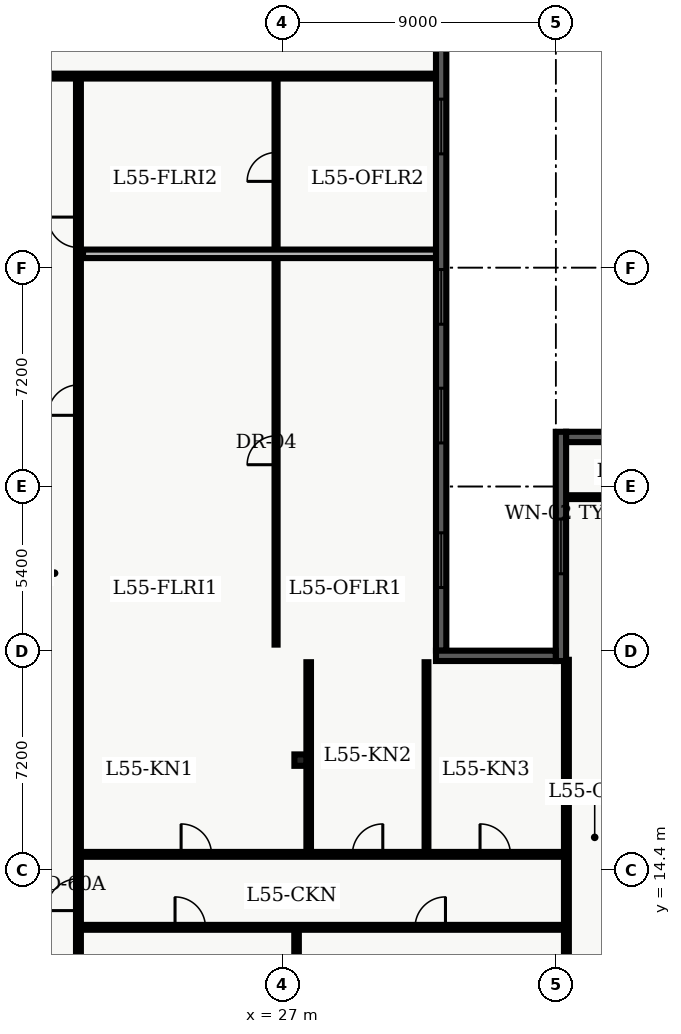
"""IFC4 building model, lengths in metres.
Left out: names, types, materials, properties, quantities, classifications, styles, units other than length and angle.
Written with IfcOpenShell. Run it as: python <this file> out.ifc"""

import sys

from ifc_helpers import new_model, entity, si_unit, converted_unit, direction, frame, origin_with_axes, origin_2d_with_axis, place, context, subcontext, project, spatial, polyline, rectangle, i_section, outline, extrude, element, fill, save


model = new_model("IFC4")
c1 = context("Model", 3, precision=1e-05, world=origin_with_axes(), true_north=direction((0.0, 1.0)))
c2 = subcontext(c1, "Body", "Model", "MODEL_VIEW")
j1 = project(units=[si_unit("LENGTHUNIT", "METRE"), converted_unit("PLANEANGLEUNIT", "DEGREE", entity("IfcPlaneAngleMeasure", 0.017), si_unit("PLANEANGLEUNIT", "RADIAN"), dimensions=[0, 0, 0, 0, 0, 0, 0])], contexts=[c1])
p1 = place(None, origin_with_axes())
s1 = spatial("IfcSite", under=j1, at=p1, CompositionType="ELEMENT")
p2 = place(p1, origin_with_axes())
s2 = spatial("IfcBuilding", under=s1, at=p2, CompositionType="ELEMENT")
p3 = place(p2, frame((0.0, 0.0, 224.7), z_axis=(0.0, 0.0, 1.0), x_axis=(1.0, 0.0, 0.0)))
s3 = spatial("IfcBuildingStorey", under=s2, at=p3, CompositionType="ELEMENT", Elevation=224.7)
p4 = place(p3, frame((27.6, 18.0, 0.0), z_axis=(0.0, 0.0, 1.0), x_axis=(1.0, 0.0, 0.0)))
e1 = element("IfcColumn", 1, at=p4, inside=s3, PredefinedType="COLUMN", context=c2, shape_type="SweptSolid", body=[
    extrude(i_section(OverallWidth=0.394, OverallDepth=0.375, WebThickness=0.017, FlangeThickness=0.028, FilletRadius=0.02, at=origin_2d_with_axis()), origin_with_axes(), (0.0, 0.0, 1.0), 3.9),
])
p5 = place(p3, frame((7.1, 40.5, 0.0), z_axis=(0.0, 0.0, 1.0), x_axis=(1.0, 0.0, 0.0)))
e2 = element("IfcWall", 2, at=p5, inside=s3, PredefinedType="PARTITIONING", context=c2, shape_type="SweptSolid", body=[
    extrude(outline(polyline([(0.0, -0.08), (24.965, -0.08), (24.965, 0.08), (0.0, 0.08), (0.0, -0.08)])), origin_with_axes(), (0.0, 0.0, 1.0), 2.7),
])
p6 = place(p5, frame((3.093, 0.0, 0.0), z_axis=(0.0, 0.0, 1.0), x_axis=(1.0, 0.0, 0.0)))
e3 = element("IfcOpeningElement", 3, at=p6, cuts=e2, PredefinedType="OPENING", context=c2, shape_type="SweptSolid", body=[
    extrude(rectangle(XDim=1.0, YDim=0.18, at=origin_2d_with_axis()), origin_with_axes(), (0.0, 0.0, 1.0), 2.15),
])
p7 = place(p5, frame((5.873, 0.0, 0.0), z_axis=(0.0, 0.0, 1.0), x_axis=(1.0, 0.0, 0.0)))
e4 = element("IfcOpeningElement", 4, at=p7, cuts=e2, PredefinedType="OPENING", context=c2, shape_type="SweptSolid", body=[
    extrude(rectangle(XDim=1.0, YDim=0.18, at=origin_2d_with_axis()), origin_with_axes(), (0.0, 0.0, 1.0), 2.15),
])
p8 = place(p5, frame((10.502, 0.0, 0.0), z_axis=(0.0, 0.0, 1.0), x_axis=(1.0, 0.0, 0.0)))
e5 = element("IfcOpeningElement", 5, at=p8, cuts=e2, PredefinedType="OPENING", context=c2, shape_type="SweptSolid", body=[
    extrude(rectangle(XDim=1.0, YDim=0.18, at=origin_2d_with_axis()), origin_with_axes(), (0.0, 0.0, 1.0), 2.15),
])
p9 = place(p3, frame((20.3, 7.8, 0.0), z_axis=(0.0, 0.0, 1.0), x_axis=(0.0, 1.0, 0.0)))
e6 = element("IfcWall", 6, at=p9, inside=s3, PredefinedType="PARTITIONING", context=c2, shape_type="SweptSolid", body=[
    extrude(outline(polyline([(0.0, -0.08), (32.7, -0.08), (32.7, 0.08), (0.0, 0.08), (0.0, -0.08)])), origin_with_axes(), (0.0, 0.0, 1.0), 2.7),
])
p10 = place(p9, frame((22.042, 0.0, 0.0), z_axis=(0.0, 0.0, 1.0), x_axis=(1.0, 0.0, 0.0)))
e7 = element("IfcOpeningElement", 7, at=p10, cuts=e6, PredefinedType="OPENING", context=c2, shape_type="SweptSolid", body=[
    extrude(rectangle(XDim=1.0, YDim=0.18, at=origin_2d_with_axis()), origin_with_axes(), (0.0, 0.0, 1.0), 2.15),
])
p11 = place(p9, frame((27.562, 0.0, 0.0), z_axis=(0.0, 0.0, 1.0), x_axis=(1.0, 0.0, 0.0)))
e8 = element("IfcOpeningElement", 8, at=p11, cuts=e6, PredefinedType="OPENING", context=c2, shape_type="SweptSolid", body=[
    extrude(rectangle(XDim=1.0, YDim=0.18, at=origin_2d_with_axis()), origin_with_axes(), (0.0, 0.0, 1.0), 2.15),
])
p12 = place(p9, frame((5.775, 0.0, 0.0), z_axis=(0.0, 0.0, 1.0), x_axis=(1.0, 0.0, 0.0)))
e9 = element("IfcOpeningElement", 9, at=p12, cuts=e6, PredefinedType="OPENING", context=c2, shape_type="SweptSolid", body=[
    extrude(rectangle(XDim=1.05, YDim=0.18, at=origin_2d_with_axis()), origin_with_axes(), (0.0, 0.0, 1.0), 2.15),
])
p13 = place(p3, frame((26.8, 21.8, 0.0), z_axis=(0.0, 0.0, 1.0), x_axis=(0.0, 1.0, 0.0)))
e10 = element("IfcWall", 10, at=p13, inside=s3, PredefinedType="PARTITIONING", context=c2, shape_type="SweptSolid", body=[
    extrude(outline(polyline([(0.0, -0.05), (18.5, -0.05), (18.5, 0.05), (0.0, 0.05), (0.0, -0.05)])), origin_with_axes(), (0.0, 0.0, 1.0), 2.7),
])
p14 = place(p13, frame((6.392, 0.0, 0.0), z_axis=(0.0, 0.0, 1.0), x_axis=(1.0, 0.0, 0.0)))
e11 = element("IfcOpeningElement", 11, at=p14, cuts=e10, PredefinedType="OPENING", context=c2, shape_type="SweptSolid", body=[
    extrude(rectangle(XDim=0.95, YDim=0.12, at=origin_2d_with_axis()), origin_with_axes(), (0.0, 0.0, 1.0), 2.15),
])
p15 = place(p13, frame((15.712, 0.0, 0.0), z_axis=(0.0, 0.0, 1.0), x_axis=(1.0, 0.0, 0.0)))
e12 = element("IfcOpeningElement", 12, at=p15, cuts=e10, PredefinedType="OPENING", context=c2, shape_type="SweptSolid", body=[
    extrude(rectangle(XDim=0.95, YDim=0.12, at=origin_2d_with_axis()), origin_with_axes(), (0.0, 0.0, 1.0), 2.15),
])
p16 = place(p3, frame((20.45, 34.654, 0.0), z_axis=(0.0, 0.0, 1.0), x_axis=(1.0, 0.0, 0.0)))
e13 = element("IfcWall", 13, at=p16, inside=s3, PredefinedType="PARTITIONING", context=c2, shape_type="SweptSolid", body=[
    extrude(outline(polyline([(0.0, -0.14), (11.615, -0.14), (11.615, 0.14), (0.0, 0.14), (0.0, -0.14)])), origin_with_axes(), (0.0, 0.0, 1.0), 2.7),
])
p17 = place(p3, frame((20.3, 12.5, 0.0), z_axis=(0.0, 0.0, 1.0), x_axis=(1.0, 0.0, 0.0)))
e14 = element("IfcWall", 14, at=p17, inside=s3, PredefinedType="PARTITIONING", context=c2, shape_type="SweptSolid", body=[
    extrude(outline(polyline([(0.0, -0.08), (16.05, -0.08), (16.05, 0.08), (0.0, 0.08), (0.0, -0.08)])), origin_with_axes(), (0.0, 0.0, 1.0), 2.7),
])
p18 = place(p17, frame((3.677, 0.0, 0.0), z_axis=(0.0, 0.0, 1.0), x_axis=(1.0, 0.0, 0.0)))
e15 = element("IfcOpeningElement", 15, at=p18, cuts=e14, PredefinedType="OPENING", context=c2, shape_type="SweptSolid", body=[
    extrude(rectangle(XDim=1.0, YDim=0.18, at=origin_2d_with_axis()), origin_with_axes(), (0.0, 0.0, 1.0), 2.15),
])
p19 = place(p17, frame((11.572, 0.0, 0.0), z_axis=(0.0, 0.0, 1.0), x_axis=(1.0, 0.0, 0.0)))
e16 = element("IfcOpeningElement", 16, at=p19, cuts=e14, PredefinedType="OPENING", context=c2, shape_type="SweptSolid", body=[
    extrude(rectangle(XDim=1.0, YDim=0.18, at=origin_2d_with_axis()), origin_with_axes(), (0.0, 0.0, 1.0), 2.15),
])
p20 = place(p3, frame((20.3, 14.9, 0.0), z_axis=(0.0, 0.0, 1.0), x_axis=(1.0, 0.0, 0.0)))
e17 = element("IfcWall", 17, at=p20, inside=s3, PredefinedType="PARTITIONING", context=c2, shape_type="SweptSolid", body=[
    extrude(outline(polyline([(0.0, -0.08), (16.05, -0.08), (16.05, 0.08), (0.0, 0.08), (0.0, -0.08)])), origin_with_axes(), (0.0, 0.0, 1.0), 2.7),
])
p21 = place(p20, frame((3.877, 0.0, 0.0), z_axis=(0.0, 0.0, 1.0), x_axis=(1.0, 0.0, 0.0)))
e18 = element("IfcOpeningElement", 18, at=p21, cuts=e17, PredefinedType="OPENING", context=c2, shape_type="SweptSolid", body=[
    extrude(rectangle(XDim=1.0, YDim=0.18, at=origin_2d_with_axis()), origin_with_axes(), (0.0, 0.0, 1.0), 2.15),
])
p22 = place(p20, frame((9.511, 0.0, 0.0), z_axis=(0.0, 0.0, 1.0), x_axis=(1.0, 0.0, 0.0)))
e19 = element("IfcOpeningElement", 19, at=p22, cuts=e17, PredefinedType="OPENING", context=c2, shape_type="SweptSolid", body=[
    extrude(rectangle(XDim=1.0, YDim=0.18, at=origin_2d_with_axis()), origin_with_axes(), (0.0, 0.0, 1.0), 2.15),
])
p23 = place(p20, frame((13.709, 0.0, 0.0), z_axis=(0.0, 0.0, 1.0), x_axis=(1.0, 0.0, 0.0)))
e20 = element("IfcOpeningElement", 20, at=p23, cuts=e17, PredefinedType="OPENING", context=c2, shape_type="SweptSolid", body=[
    extrude(rectangle(XDim=1.0, YDim=0.18, at=origin_2d_with_axis()), origin_with_axes(), (0.0, 0.0, 1.0), 2.15),
])
p24 = place(p3, frame((36.35, 4.35, 0.0), z_axis=(0.0, 0.0, 1.0), x_axis=(0.0, 1.0, 0.0)))
e21 = element("IfcWall", 21, at=p24, inside=s3, PredefinedType="PARTITIONING", context=c2, shape_type="SweptSolid", body=[
    extrude(outline(polyline([(0.0, -0.08), (16.95, -0.08), (16.95, 0.08), (0.0, 0.08), (0.0, -0.08)])), origin_with_axes(), (0.0, 0.0, 1.0), 2.7),
])
p25 = place(p3, frame((27.474, 0.335, 0.0), z_axis=(0.0, 0.0, 1.0), x_axis=(0.0, 1.0, 0.0)))
e22 = element("IfcWall", 22, at=p25, inside=s3, PredefinedType="PARTITIONING", context=c2, shape_type="SweptSolid", body=[
    extrude(outline(polyline([(0.0, -0.075), (12.045, -0.075), (12.045, 0.075), (0.0, 0.075), (0.0, -0.075)])), origin_with_axes(), (0.0, 0.0, 1.0), 2.7),
])
p26 = place(p3, frame((27.873, 15.02, 0.0), z_axis=(0.0, 0.0, 1.0), x_axis=(0.0, 1.0, 0.0)))
e23 = element("IfcWall", 23, at=p26, inside=s3, PredefinedType="PARTITIONING", context=c2, shape_type="SweptSolid", body=[
    extrude(outline(polyline([(0.0, -0.075), (6.2, -0.075), (6.2, 0.075), (0.0, 0.075), (0.0, -0.075)])), origin_with_axes(), (0.0, 0.0, 1.0), 2.7),
])
p27 = place(p3, frame((31.748, 15.02, 0.0), z_axis=(0.0, 0.0, 1.0), x_axis=(0.0, 1.0, 0.0)))
e24 = element("IfcWall", 24, at=p27, inside=s3, PredefinedType="PARTITIONING", context=c2, shape_type="SweptSolid", body=[
    extrude(outline(polyline([(0.0, -0.062), (6.2, -0.062), (6.2, 0.062), (0.0, 0.062), (0.0, -0.062)])), origin_with_axes(), (0.0, 0.0, 1.0), 2.7),
])
p28 = place(p3, frame((36.335, 26.65, 0.0), z_axis=(0.0, 0.0, 1.0), x_axis=(1.0, 0.0, 0.0)))
e25 = element("IfcWall", 25, at=p28, inside=s3, PredefinedType="PARTITIONING", context=c2, shape_type="SweptSolid", body=[
    extrude(outline(polyline([(0.0, -0.062), (11.195, -0.062), (11.195, 0.062), (0.0, 0.062), (0.0, -0.062)])), origin_with_axes(), (0.0, 0.0, 1.0), 2.7),
])
p29 = place(p28, frame((6.665, 0.0, 0.0), z_axis=(0.0, 0.0, 1.0), x_axis=(1.0, 0.0, 0.0)))
e26 = element("IfcOpeningElement", 26, at=p29, cuts=e25, PredefinedType="OPENING", context=c2, shape_type="SweptSolid", body=[
    extrude(rectangle(XDim=1.0, YDim=0.145, at=origin_2d_with_axis()), origin_with_axes(), (0.0, 0.0, 1.0), 2.15),
])
p30 = place(p3, frame((36.17, 21.26, 0.0), z_axis=(0.0, 0.0, 1.0), x_axis=(0.0, 1.0, 0.0)))
e27 = element("IfcWall", 27, at=p30, inside=s3, PredefinedType="SOLIDWALL", context=c2, shape_type="SweptSolid", body=[
    extrude(outline(polyline([(0.0, -0.17), (7.54, -0.17), (7.54, 0.17), (0.0, 0.17), (0.0, -0.17)])), origin_with_axes(), (0.0, 0.0, 1.0), 3.66),
])
p31 = place(p30, frame((3.77, 0.0, 0.45), z_axis=(0.0, 0.0, 1.0), x_axis=(1.0, 0.0, 0.0)))
e28 = element("IfcOpeningElement", 28, at=p31, cuts=e27, PredefinedType="OPENING", context=c2, shape_type="SweptSolid", body=[
    extrude(rectangle(XDim=1.8, YDim=0.36, at=origin_2d_with_axis()), origin_with_axes(), (0.0, 0.0, 1.0), 2.1),
])
p32 = place(p3, frame((36.34, 28.63, 0.0), z_axis=(0.0, 0.0, 1.0), x_axis=(1.0, 0.0, 0.0)))
e29 = element("IfcWall", 29, at=p32, inside=s3, PredefinedType="SOLIDWALL", context=c2, shape_type="SweptSolid", body=[
    extrude(outline(polyline([(0.0, -0.17), (13.46, -0.17), (13.46, 0.17), (0.0, 0.17), (0.0, -0.17)])), origin_with_axes(), (0.0, 0.0, 1.0), 3.66),
])
p33 = place(p32, frame((3.665, 0.0, 0.45), z_axis=(0.0, 0.0, 1.0), x_axis=(1.0, 0.0, 0.0)))
e30 = element("IfcOpeningElement", 30, at=p33, cuts=e29, PredefinedType="OPENING", context=c2, shape_type="SweptSolid", body=[
    extrude(rectangle(XDim=1.8, YDim=0.36, at=origin_2d_with_axis()), origin_with_axes(), (0.0, 0.0, 1.0), 2.1),
])
p34 = place(p32, frame((9.795, 0.0, 0.45), z_axis=(0.0, 0.0, 1.0), x_axis=(1.0, 0.0, 0.0)))
e31 = element("IfcOpeningElement", 31, at=p34, cuts=e29, PredefinedType="OPENING", context=c2, shape_type="SweptSolid", body=[
    extrude(rectangle(XDim=1.8, YDim=0.36, at=origin_2d_with_axis()), origin_with_axes(), (0.0, 0.0, 1.0), 2.1),
])
p35 = place(p3, frame((32.23, 41.82, 0.0), z_axis=(0.0, 0.0, 1.0), x_axis=(0.0, -1.0, 0.0)))
e32 = element("IfcWall", 32, at=p35, inside=s3, PredefinedType="SOLIDWALL", context=c2, shape_type="SweptSolid", body=[
    extrude(outline(polyline([(0.0, -0.17), (20.22, -0.17), (20.22, 0.17), (0.0, 0.17), (0.0, -0.17)])), origin_with_axes(), (0.0, 0.0, 1.0), 3.66),
])
p36 = place(p35, frame((2.978, 0.0, 0.45), z_axis=(0.0, 0.0, 1.0), x_axis=(1.0, 0.0, 0.0)))
e33 = element("IfcOpeningElement", 33, at=p36, cuts=e32, PredefinedType="OPENING", context=c2, shape_type="SweptSolid", body=[
    extrude(rectangle(XDim=1.8, YDim=0.36, at=origin_2d_with_axis()), origin_with_axes(), (0.0, 0.0, 1.0), 2.1),
])
p37 = place(p35, frame((8.582, 0.0, 0.45), z_axis=(0.0, 0.0, 1.0), x_axis=(1.0, 0.0, 0.0)))
e34 = element("IfcOpeningElement", 34, at=p37, cuts=e32, PredefinedType="OPENING", context=c2, shape_type="SweptSolid", body=[
    extrude(rectangle(XDim=1.8, YDim=0.36, at=origin_2d_with_axis()), origin_with_axes(), (0.0, 0.0, 1.0), 2.1),
])
p38 = place(p35, frame((12.487, 0.0, 0.45), z_axis=(0.0, 0.0, 1.0), x_axis=(1.0, 0.0, 0.0)))
e35 = element("IfcOpeningElement", 35, at=p38, cuts=e32, PredefinedType="OPENING", context=c2, shape_type="SweptSolid", body=[
    extrude(rectangle(XDim=1.8, YDim=0.36, at=origin_2d_with_axis()), origin_with_axes(), (0.0, 0.0, 1.0), 2.1),
])
p39 = place(p35, frame((17.243, 0.0, 0.45), z_axis=(0.0, 0.0, 1.0), x_axis=(1.0, 0.0, 0.0)))
e36 = element("IfcOpeningElement", 36, at=p39, cuts=e32, PredefinedType="OPENING", context=c2, shape_type="SweptSolid", body=[
    extrude(rectangle(XDim=1.8, YDim=0.36, at=origin_2d_with_axis()), origin_with_axes(), (0.0, 0.0, 1.0), 2.1),
])
p40 = place(p3, frame((32.06, 21.43, 0.0), z_axis=(0.0, 0.0, 1.0), x_axis=(1.0, 0.0, 0.0)))
e37 = element("IfcWall", 37, at=p40, inside=s3, PredefinedType="SOLIDWALL", context=c2, shape_type="SweptSolid", body=[
    extrude(outline(polyline([(0.0, -0.17), (3.94, -0.17), (3.94, 0.17), (0.0, 0.17), (0.0, -0.17)])), origin_with_axes(), (0.0, 0.0, 1.0), 3.66),
])
p41 = place(p13, frame((6.392, 0.0, 0.0), z_axis=(0.0, 0.0, 1.0), x_axis=(1.0, 0.0, 0.0)))
e38 = element("IfcDoor", 38, at=p41, inside=s3, OperationType="SINGLE_SWING_LEFT", PredefinedType="DOOR", context=c2, shape_type="SweptSolid", body=[
    extrude(rectangle(XDim=0.95, YDim=0.06, at=origin_2d_with_axis()), origin_with_axes(), (0.0, 0.0, 1.0), 2.15),
])
fill(e11, e38)
p42 = place(p9, frame((22.042, 0.0, 0.0), z_axis=(0.0, 0.0, 1.0), x_axis=(1.0, 0.0, 0.0)))
e39 = element("IfcDoor", 39, at=p42, inside=s3, OperationType="SINGLE_SWING_LEFT", PredefinedType="DOOR", context=c2, shape_type="SweptSolid", body=[
    extrude(rectangle(XDim=1.0, YDim=0.09, at=origin_2d_with_axis()), origin_with_axes(), (0.0, 0.0, 1.0), 2.15),
])
fill(e7, e39)
p43 = place(p13, frame((15.712, 0.0, 0.0), z_axis=(0.0, 0.0, 1.0), x_axis=(1.0, 0.0, 0.0)))
e40 = element("IfcDoor", 40, at=p43, inside=s3, OperationType="SINGLE_SWING_LEFT", PredefinedType="DOOR", context=c2, shape_type="SweptSolid", body=[
    extrude(rectangle(XDim=0.95, YDim=0.06, at=origin_2d_with_axis()), origin_with_axes(), (0.0, 0.0, 1.0), 2.15),
])
fill(e12, e40)
p44 = place(p9, frame((27.562, 0.0, 0.0), z_axis=(0.0, 0.0, 1.0), x_axis=(1.0, 0.0, 0.0)))
e41 = element("IfcDoor", 41, at=p44, inside=s3, OperationType="SINGLE_SWING_RIGHT", PredefinedType="DOOR", context=c2, shape_type="SweptSolid", body=[
    extrude(rectangle(XDim=1.0, YDim=0.09, at=origin_2d_with_axis()), origin_with_axes(), (0.0, 0.0, 1.0), 2.15),
])
fill(e8, e41)
p45 = place(p9, frame((5.775, 0.0, 0.0), z_axis=(0.0, 0.0, 1.0), x_axis=(1.0, 0.0, 0.0)))
e42 = element("IfcDoor", 42, at=p45, inside=s3, OperationType="SINGLE_SWING_LEFT", PredefinedType="DOOR", context=c2, shape_type="SweptSolid", body=[
    extrude(rectangle(XDim=1.05, YDim=0.09, at=origin_2d_with_axis()), origin_with_axes(), (0.0, 0.0, 1.0), 2.15),
])
fill(e9, e42)
p46 = place(p17, frame((3.677, 0.0, 0.0), z_axis=(0.0, 0.0, 1.0), x_axis=(1.0, 0.0, 0.0)))
e43 = element("IfcDoor", 43, at=p46, inside=s3, OperationType="SINGLE_SWING_LEFT", PredefinedType="DOOR", context=c2, shape_type="SweptSolid", body=[
    extrude(rectangle(XDim=1.0, YDim=0.09, at=origin_2d_with_axis()), origin_with_axes(), (0.0, 0.0, 1.0), 2.15),
])
fill(e15, e43)
p47 = place(p17, frame((11.572, 0.0, 0.0), z_axis=(0.0, 0.0, 1.0), x_axis=(1.0, 0.0, 0.0)))
e44 = element("IfcDoor", 44, at=p47, inside=s3, OperationType="SINGLE_SWING_RIGHT", PredefinedType="DOOR", context=c2, shape_type="SweptSolid", body=[
    extrude(rectangle(XDim=1.0, YDim=0.09, at=origin_2d_with_axis()), origin_with_axes(), (0.0, 0.0, 1.0), 2.15),
])
fill(e16, e44)
p48 = place(p20, frame((3.877, 0.0, 0.0), z_axis=(0.0, 0.0, 1.0), x_axis=(1.0, 0.0, 0.0)))
e45 = element("IfcDoor", 45, at=p48, inside=s3, OperationType="SINGLE_SWING_LEFT", PredefinedType="DOOR", context=c2, shape_type="SweptSolid", body=[
    extrude(rectangle(XDim=1.0, YDim=0.09, at=origin_2d_with_axis()), origin_with_axes(), (0.0, 0.0, 1.0), 2.15),
])
fill(e18, e45)
p49 = place(p20, frame((9.511, 0.0, 0.0), z_axis=(0.0, 0.0, 1.0), x_axis=(1.0, 0.0, 0.0)))
e46 = element("IfcDoor", 46, at=p49, inside=s3, OperationType="SINGLE_SWING_RIGHT", PredefinedType="DOOR", context=c2, shape_type="SweptSolid", body=[
    extrude(rectangle(XDim=1.0, YDim=0.09, at=origin_2d_with_axis()), origin_with_axes(), (0.0, 0.0, 1.0), 2.15),
])
fill(e19, e46)
p50 = place(p20, frame((13.709, 0.0, 0.0), z_axis=(0.0, 0.0, 1.0), x_axis=(1.0, 0.0, 0.0)))
e47 = element("IfcDoor", 47, at=p50, inside=s3, OperationType="SINGLE_SWING_LEFT", PredefinedType="DOOR", context=c2, shape_type="SweptSolid", body=[
    extrude(rectangle(XDim=1.0, YDim=0.09, at=origin_2d_with_axis()), origin_with_axes(), (0.0, 0.0, 1.0), 2.15),
])
fill(e20, e47)
p51 = place(p30, frame((3.77, 0.0, 0.45), z_axis=(0.0, 0.0, 1.0), x_axis=(1.0, 0.0, 0.0)))
e48 = element("IfcWindow", 48, at=p51, inside=s3, PredefinedType="WINDOW", context=c2, shape_type="SweptSolid", body=[
    extrude(rectangle(XDim=1.8, YDim=0.09, at=origin_2d_with_axis()), origin_with_axes(), (0.0, 0.0, 1.0), 2.1),
])
fill(e28, e48)
p52 = place(p35, frame((2.978, 0.0, 0.45), z_axis=(0.0, 0.0, 1.0), x_axis=(1.0, 0.0, 0.0)))
e49 = element("IfcWindow", 49, at=p52, inside=s3, PredefinedType="WINDOW", context=c2, shape_type="SweptSolid", body=[
    extrude(rectangle(XDim=1.8, YDim=0.09, at=origin_2d_with_axis()), origin_with_axes(), (0.0, 0.0, 1.0), 2.1),
])
fill(e33, e49)
p53 = place(p35, frame((8.582, 0.0, 0.45), z_axis=(0.0, 0.0, 1.0), x_axis=(1.0, 0.0, 0.0)))
e50 = element("IfcWindow", 50, at=p53, inside=s3, PredefinedType="WINDOW", context=c2, shape_type="SweptSolid", body=[
    extrude(rectangle(XDim=1.8, YDim=0.09, at=origin_2d_with_axis()), origin_with_axes(), (0.0, 0.0, 1.0), 2.1),
])
fill(e34, e50)
p54 = place(p35, frame((12.487, 0.0, 0.45), z_axis=(0.0, 0.0, 1.0), x_axis=(1.0, 0.0, 0.0)))
e51 = element("IfcWindow", 51, at=p54, inside=s3, PredefinedType="WINDOW", context=c2, shape_type="SweptSolid", body=[
    extrude(rectangle(XDim=1.8, YDim=0.09, at=origin_2d_with_axis()), origin_with_axes(), (0.0, 0.0, 1.0), 2.1),
])
fill(e35, e51)
p55 = place(p35, frame((17.243, 0.0, 0.45), z_axis=(0.0, 0.0, 1.0), x_axis=(1.0, 0.0, 0.0)))
e52 = element("IfcWindow", 52, at=p55, inside=s3, PredefinedType="WINDOW", context=c2, shape_type="SweptSolid", body=[
    extrude(rectangle(XDim=1.8, YDim=0.09, at=origin_2d_with_axis()), origin_with_axes(), (0.0, 0.0, 1.0), 2.1),
])
fill(e36, e52)
save(model, sys.argv[1])
